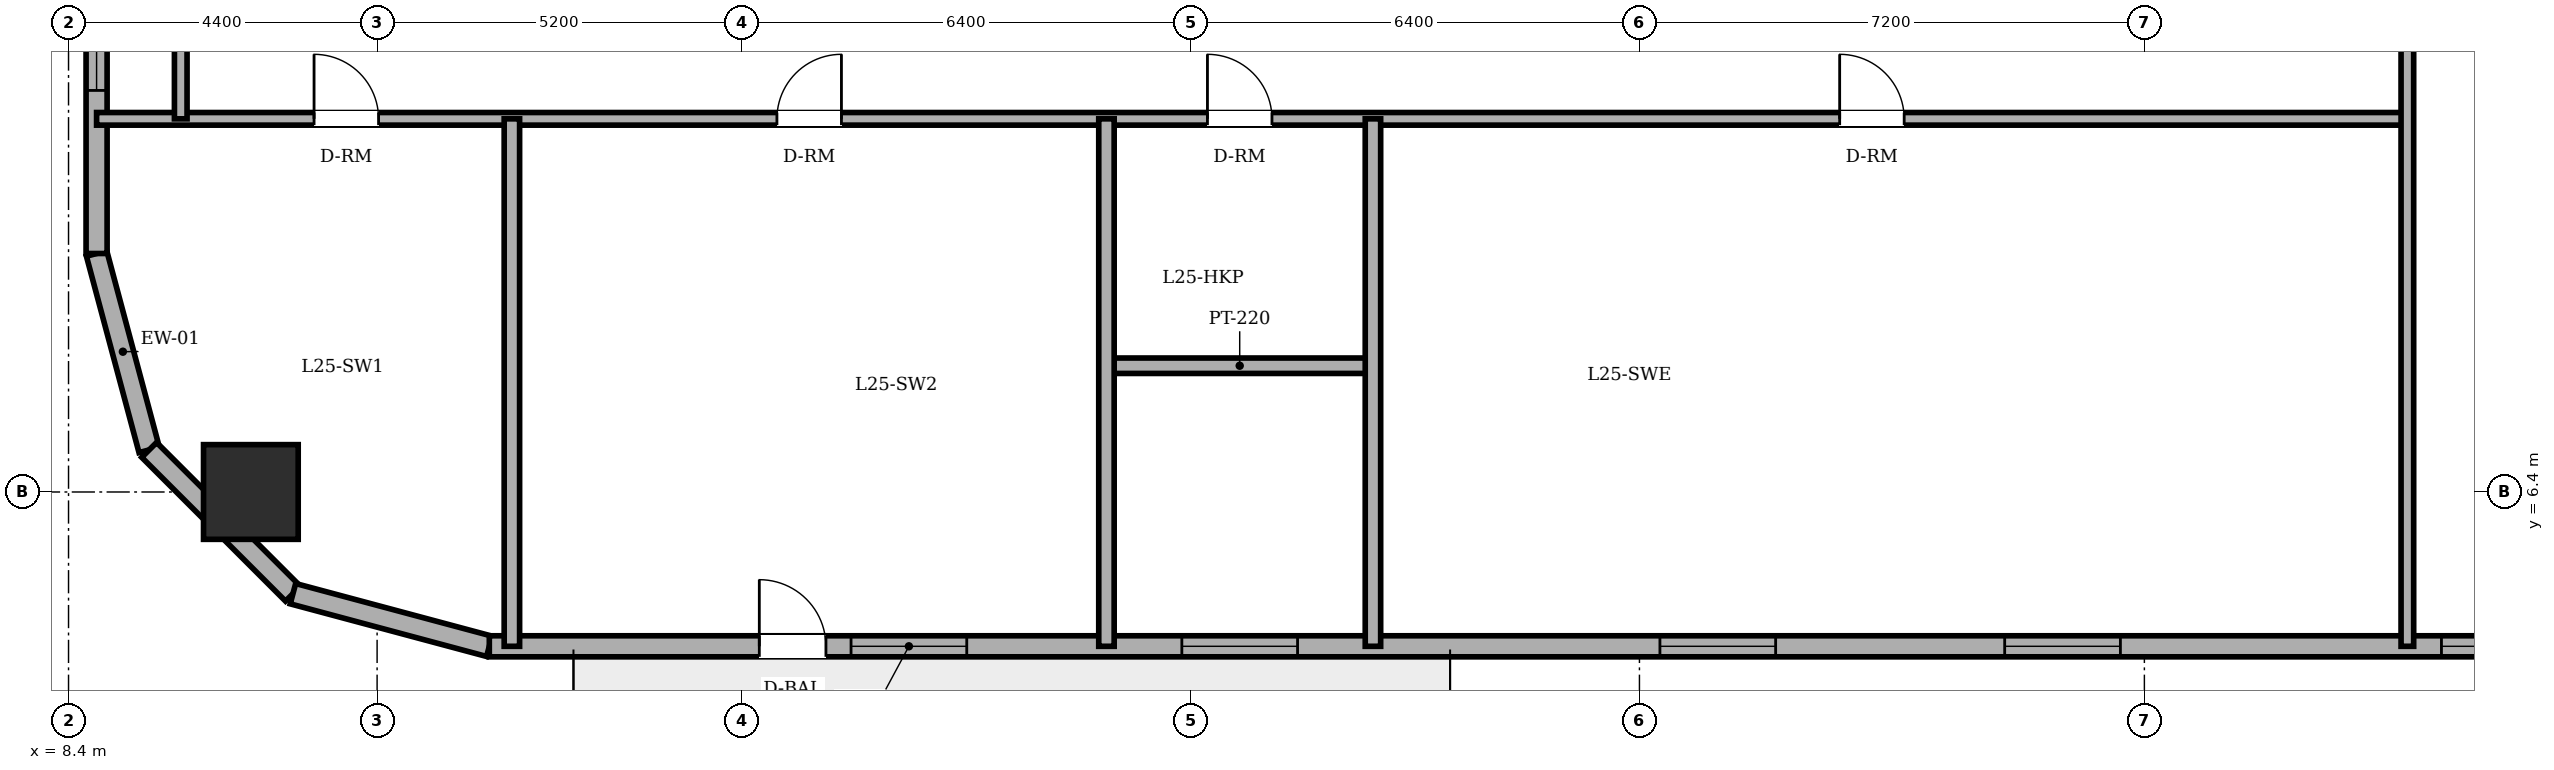
"""IFC4 building model, lengths in metres.
Left out: names, types, materials, properties, quantities, classifications, styles, units other than length and angle.
Written with IfcOpenShell. Run it as: python <this file> out.ifc"""

import sys

from ifc_helpers import new_model, si_unit, direction, frame, frame_2d, origin, origin_2d, place, context, subcontext, project, spatial, rectangle, circle, extrude, element, fill, save


model = new_model("IFC4")
c1 = context("Model", 3, precision=1e-05, world=origin(), true_north=direction((0.0, 1.0)))
c2 = subcontext(c1, "Body", "Model", "MODEL_VIEW")
j1 = project(units=[si_unit("LENGTHUNIT", "METRE"), si_unit("PLANEANGLEUNIT", "RADIAN")], contexts=[c1])
p1 = place(None, origin())
s1 = spatial("IfcSite", under=j1, at=p1, CompositionType="ELEMENT")
p2 = place(p1, origin())
s2 = spatial("IfcBuilding", under=s1, at=p2, CompositionType="ELEMENT")
p3 = place(p2, frame((0.0, 0.0, 97.1)))
s3 = spatial("IfcBuildingStorey", under=s2, at=p3, CompositionType="ELEMENT", Elevation=97.1)
p4 = place(p3, frame((11.0, 6.4, 0.0), z_axis=(0.0, 0.0, 1.0), x_axis=(1.0, 0.0, 0.0)))
e1 = element("IfcColumn", 1, at=p4, inside=s3, PredefinedType="COLUMN", context=c2, shape_type="SweptSolid", body=[
    extrude(circle(Radius=0.675, at=origin_2d()), origin(), (0.0, 0.0, 1.0), 3.6),
])
p5 = place(p3, frame((8.8, 9.8, 0.0), z_axis=(0.0, 0.0, 1.0), x_axis=(0.258731875344, -0.96594917914, 0.0)))
e2 = element("IfcWall", 2, at=p5, inside=s3, PredefinedType="SOLIDWALL", context=c2, shape_type="SweptSolid", body=[
    extrude(rectangle(XDim=2.899, YDim=0.3, at=frame_2d((1.449, 0.0))), origin(), (0.0, 0.0, 1.0), 3.4),
])
p6 = place(p3, frame((9.55, 7.0, 0.0), z_axis=(0.0, 0.0, 1.0), x_axis=(0.707106781187, -0.707106781187, 0.0)))
e3 = element("IfcWall", 3, at=p6, inside=s3, PredefinedType="SOLIDWALL", context=c2, shape_type="SweptSolid", body=[
    extrude(rectangle(XDim=2.899, YDim=0.3, at=frame_2d((1.45, 0.0))), origin(), (0.0, 0.0, 1.0), 3.4),
])
p7 = place(p3, frame((11.6, 4.95, 0.0), z_axis=(0.0, 0.0, 1.0), x_axis=(0.965943540406, -0.258752926066, 0.0)))
e4 = element("IfcWall", 4, at=p7, inside=s3, PredefinedType="SOLIDWALL", context=c2, shape_type="SweptSolid", body=[
    extrude(rectangle(XDim=2.898, YDim=0.3, at=frame_2d((1.449, 0.0))), origin(), (0.0, 0.0, 1.0), 3.4),
])
p8 = place(p3, frame((14.4, 4.2, 0.0), z_axis=(0.0, 0.0, 1.0), x_axis=(1.0, 0.0, 0.0)))
e5 = element("IfcWall", 5, at=p8, inside=s3, PredefinedType="SOLIDWALL", context=c2, shape_type="SweptSolid", body=[
    extrude(rectangle(XDim=29.933, YDim=0.3, at=frame_2d((14.967, 0.0))), origin(), (0.0, 0.0, 1.0), 3.4),
])
p9 = place(p8, frame((3.85, 0.0, 0.0)))
e6 = element("IfcOpeningElement", 6, at=p9, cuts=e5, PredefinedType="OPENING", context=c2, shape_type="SweptSolid", body=[
    extrude(rectangle(XDim=0.95, YDim=2.2, at=frame_2d((0.475, 1.1))), frame((0.0, 0.16, 0.0), z_axis=(0.0, -1.0, 0.0), x_axis=(1.0, 0.0, 0.0)), (0.0, 0.0, 1.0), 0.32),
])
p10 = place(p8, frame((5.158, 0.0, 0.85)))
e7 = element("IfcOpeningElement", 7, at=p10, cuts=e5, PredefinedType="OPENING", context=c2, shape_type="SweptSolid", body=[
    extrude(rectangle(XDim=1.65, YDim=1.55, at=frame_2d((0.825, 0.775))), frame((0.0, 0.16, 0.0), z_axis=(0.0, -1.0, 0.0), x_axis=(1.0, 0.0, 0.0)), (0.0, 0.0, 1.0), 0.32),
])
p11 = place(p8, frame((9.875, 0.0, 0.85)))
e8 = element("IfcOpeningElement", 8, at=p11, cuts=e5, PredefinedType="OPENING", context=c2, shape_type="SweptSolid", body=[
    extrude(rectangle(XDim=1.65, YDim=1.55, at=frame_2d((0.825, 0.775))), frame((0.0, 0.16, 0.0), z_axis=(0.0, -1.0, 0.0), x_axis=(1.0, 0.0, 0.0)), (0.0, 0.0, 1.0), 0.32),
])
p12 = place(p8, frame((16.692, 0.0, 0.85)))
e9 = element("IfcOpeningElement", 9, at=p12, cuts=e5, PredefinedType="OPENING", context=c2, shape_type="SweptSolid", body=[
    extrude(rectangle(XDim=1.65, YDim=1.55, at=frame_2d((0.825, 0.775))), frame((0.0, 0.16, 0.0), z_axis=(0.0, -1.0, 0.0), x_axis=(1.0, 0.0, 0.0)), (0.0, 0.0, 1.0), 0.32),
])
p13 = place(p8, frame((21.608, 0.0, 0.85)))
e10 = element("IfcOpeningElement", 10, at=p13, cuts=e5, PredefinedType="OPENING", context=c2, shape_type="SweptSolid", body=[
    extrude(rectangle(XDim=1.65, YDim=1.55, at=frame_2d((0.825, 0.775))), frame((0.0, 0.16, 0.0), z_axis=(0.0, -1.0, 0.0), x_axis=(1.0, 0.0, 0.0)), (0.0, 0.0, 1.0), 0.32),
])
p14 = place(p8, frame((27.836, 0.0, 0.85)))
e11 = element("IfcOpeningElement", 11, at=p14, cuts=e5, PredefinedType="OPENING", context=c2, shape_type="SweptSolid", body=[
    extrude(rectangle(XDim=1.05, YDim=1.55, at=frame_2d((0.525, 0.775))), frame((0.0, 0.16, 0.0), z_axis=(0.0, -1.0, 0.0), x_axis=(1.0, 0.0, 0.0)), (0.0, 0.0, 1.0), 0.32),
])
p15 = place(p3, frame((8.8, 38.2, 0.0), z_axis=(0.0, 0.0, 1.0), x_axis=(0.0, -1.0, 0.0)))
e12 = element("IfcWall", 12, at=p15, inside=s3, PredefinedType="SOLIDWALL", context=c2, shape_type="SweptSolid", body=[
    extrude(rectangle(XDim=28.4, YDim=0.3, at=frame_2d((14.2, 0.0))), origin(), (0.0, 0.0, 1.0), 3.4),
])
p16 = place(p15, frame((2.325, 0.0, 0.85)))
e13 = element("IfcOpeningElement", 13, at=p16, cuts=e12, PredefinedType="OPENING", context=c2, shape_type="SweptSolid", body=[
    extrude(rectangle(XDim=1.65, YDim=1.55, at=frame_2d((0.825, 0.775))), frame((0.0, 0.16, 0.0), z_axis=(0.0, -1.0, 0.0), x_axis=(1.0, 0.0, 0.0)), (0.0, 0.0, 1.0), 0.32),
])
p17 = place(p15, frame((7.328, 0.0, 0.85)))
e14 = element("IfcOpeningElement", 14, at=p17, cuts=e12, PredefinedType="OPENING", context=c2, shape_type="SweptSolid", body=[
    extrude(rectangle(XDim=1.65, YDim=1.55, at=frame_2d((0.825, 0.775))), frame((0.0, 0.16, 0.0), z_axis=(0.0, -1.0, 0.0), x_axis=(1.0, 0.0, 0.0)), (0.0, 0.0, 1.0), 0.32),
])
p18 = place(p15, frame((11.102, 0.0, 0.85)))
e15 = element("IfcOpeningElement", 15, at=p18, cuts=e12, PredefinedType="OPENING", context=c2, shape_type="SweptSolid", body=[
    extrude(rectangle(XDim=1.65, YDim=1.55, at=frame_2d((0.825, 0.775))), frame((0.0, 0.16, 0.0), z_axis=(0.0, -1.0, 0.0), x_axis=(1.0, 0.0, 0.0)), (0.0, 0.0, 1.0), 0.32),
])
p19 = place(p15, frame((17.648, 0.0, 0.85)))
e16 = element("IfcOpeningElement", 16, at=p19, cuts=e12, PredefinedType="OPENING", context=c2, shape_type="SweptSolid", body=[
    extrude(rectangle(XDim=1.65, YDim=1.55, at=frame_2d((0.825, 0.775))), frame((0.0, 0.16, 0.0), z_axis=(0.0, -1.0, 0.0), x_axis=(1.0, 0.0, 0.0)), (0.0, 0.0, 1.0), 0.32),
])
p20 = place(p15, frame((20.422, 0.0, 0.85)))
e17 = element("IfcOpeningElement", 17, at=p20, cuts=e12, PredefinedType="OPENING", context=c2, shape_type="SweptSolid", body=[
    extrude(rectangle(XDim=1.65, YDim=1.55, at=frame_2d((0.825, 0.775))), frame((0.0, 0.16, 0.0), z_axis=(0.0, -1.0, 0.0), x_axis=(1.0, 0.0, 0.0)), (0.0, 0.0, 1.0), 0.32),
])
p21 = place(p15, frame((24.425, 0.0, 0.85)))
e18 = element("IfcOpeningElement", 18, at=p21, cuts=e12, PredefinedType="OPENING", context=c2, shape_type="SweptSolid", body=[
    extrude(rectangle(XDim=1.65, YDim=1.55, at=frame_2d((0.825, 0.775))), frame((0.0, 0.16, 0.0), z_axis=(0.0, -1.0, 0.0), x_axis=(1.0, 0.0, 0.0)), (0.0, 0.0, 1.0), 0.32),
])
p22 = place(p3, frame((23.2, 8.2, 0.0), z_axis=(0.0, 0.0, 1.0), x_axis=(1.0, 0.0, 0.0)))
e19 = element("IfcWall", 19, at=p22, inside=s3, PredefinedType="PARTITIONING", context=c2, shape_type="SweptSolid", body=[
    extrude(rectangle(XDim=3.8, YDim=0.22, at=frame_2d((1.9, 0.0))), origin(), (0.0, 0.0, 1.0), 3.4),
])
p23 = place(p3, frame((8.8, 11.72, 0.0), z_axis=(0.0, 0.0, 1.0), x_axis=(1.0, 0.0, 0.0)))
e20 = element("IfcWall", 20, at=p23, inside=s3, PredefinedType="PARTITIONING", context=c2, shape_type="SweptSolid", body=[
    extrude(rectangle(XDim=32.95, YDim=0.18, at=frame_2d((16.475, 0.0))), origin(), (0.0, 0.0, 1.0), 3.4),
])
p24 = place(p23, frame((15.84, 0.0, 0.0)))
e21 = element("IfcOpeningElement", 21, at=p24, cuts=e20, PredefinedType="OPENING", context=c2, shape_type="SweptSolid", body=[
    extrude(rectangle(XDim=0.92, YDim=2.1, at=frame_2d((0.46, 1.05))), frame((0.0, 0.1, 0.0), z_axis=(0.0, -1.0, 0.0), x_axis=(1.0, 0.0, 0.0)), (0.0, 0.0, 1.0), 0.2),
])
p25 = place(p23, frame((3.101, 0.0, 0.0)))
e22 = element("IfcOpeningElement", 22, at=p25, cuts=e20, PredefinedType="OPENING", context=c2, shape_type="SweptSolid", body=[
    extrude(rectangle(XDim=0.92, YDim=2.1, at=frame_2d((0.46, 1.05))), frame((0.0, 0.1, 0.0), z_axis=(0.0, -1.0, 0.0), x_axis=(1.0, 0.0, 0.0)), (0.0, 0.0, 1.0), 0.2),
])
p26 = place(p23, frame((9.701, 0.0, 0.0)))
e23 = element("IfcOpeningElement", 23, at=p26, cuts=e20, PredefinedType="OPENING", context=c2, shape_type="SweptSolid", body=[
    extrude(rectangle(XDim=0.92, YDim=2.1, at=frame_2d((0.46, 1.05))), frame((0.0, 0.1, 0.0), z_axis=(0.0, -1.0, 0.0), x_axis=(1.0, 0.0, 0.0)), (0.0, 0.0, 1.0), 0.2),
])
p27 = place(p23, frame((24.855, 0.0, 0.0)))
e24 = element("IfcOpeningElement", 24, at=p27, cuts=e20, PredefinedType="OPENING", context=c2, shape_type="SweptSolid", body=[
    extrude(rectangle(XDim=0.92, YDim=2.1, at=frame_2d((0.46, 1.05))), frame((0.0, 0.1, 0.0), z_axis=(0.0, -1.0, 0.0), x_axis=(1.0, 0.0, 0.0)), (0.0, 0.0, 1.0), 0.2),
])
p28 = place(p3, frame((10.0, 11.72, 0.0), z_axis=(0.0, 0.0, 1.0), x_axis=(0.0, 1.0, 0.0)))
e25 = element("IfcWall", 25, at=p28, inside=s3, PredefinedType="PARTITIONING", context=c2, shape_type="SweptSolid", body=[
    extrude(rectangle(XDim=2.46, YDim=0.18, at=frame_2d((1.23, 0.0))), origin(), (0.0, 0.0, 1.0), 3.4),
])
for number, where, z_axis, x_axis in (
    (26, (14.722, 4.2, 0.0), (0.0, 0.0, 1.0), (0.0, 1.0, 0.0)),
    (27, (23.2, 4.2, 0.0), (0.0, 0.0, 1.0), (0.0, 1.0, 0.0)),
    (28, (27.0, 4.2, 0.0), (0.0, 0.0, 1.0), (0.0, 1.0, 0.0)),
):
    element("IfcWall", number, at=place(p3, frame(where, z_axis=z_axis, x_axis=x_axis)), inside=s3, PredefinedType="PARTITIONING", context=c2, shape_type="SweptSolid", body=[
        extrude(rectangle(XDim=7.52, YDim=0.22, at=frame_2d((3.76, 0.0))), origin(), (0.0, 0.0, 1.0), 3.4),
    ])
p29 = place(p3, frame((41.75, 4.2, 0.0), z_axis=(0.0, 0.0, 1.0), x_axis=(0.0, 1.0, 0.0)))
e29 = element("IfcWall", 29, at=p29, inside=s3, PredefinedType="PARTITIONING", context=c2, shape_type="SweptSolid", body=[
    extrude(rectangle(XDim=18.62, YDim=0.18, at=frame_2d((9.31, 0.0))), origin(), (0.0, 0.0, 1.0), 3.4),
])
p30 = place(p29, frame((12.31, 0.0, 0.0)))
e30 = element("IfcOpeningElement", 30, at=p30, cuts=e29, PredefinedType="OPENING", context=c2, shape_type="SweptSolid", body=[
    extrude(rectangle(XDim=1.0, YDim=2.15, at=frame_2d((0.5, 1.075))), frame((0.0, 0.1, 0.0), z_axis=(0.0, -1.0, 0.0), x_axis=(1.0, 0.0, 0.0)), (0.0, 0.0, 1.0), 0.2),
])
p31 = place(p9, origin())
e31 = element("IfcDoor", 31, at=p31, inside=s3, OperationType="SINGLE_SWING_LEFT", PredefinedType="DOOR", context=c2, shape_type="SweptSolid", body=[
    extrude(rectangle(XDim=0.95, YDim=2.2, at=frame_2d((0.475, 1.1))), frame((0.0, 0.025, 0.0), z_axis=(0.0, -1.0, 0.0), x_axis=(1.0, 0.0, 0.0)), (0.0, 0.0, 1.0), 0.05),
])
fill(e6, e31)
p32 = place(p10, origin())
e32 = element("IfcWindow", 32, at=p32, inside=s3, PartitioningType="DOUBLE_PANEL_VERTICAL", PredefinedType="WINDOW", context=c2, shape_type="SweptSolid", body=[
    extrude(rectangle(XDim=1.65, YDim=1.55, at=frame_2d((0.825, 0.775))), frame((0.0, 0.03, 0.0), z_axis=(0.0, -1.0, 0.0), x_axis=(1.0, 0.0, 0.0)), (0.0, 0.0, 1.0), 0.06),
])
fill(e7, e32)
p33 = place(p11, origin())
e33 = element("IfcWindow", 33, at=p33, inside=s3, PartitioningType="DOUBLE_PANEL_VERTICAL", PredefinedType="WINDOW", context=c2, shape_type="SweptSolid", body=[
    extrude(rectangle(XDim=1.65, YDim=1.55, at=frame_2d((0.825, 0.775))), frame((0.0, 0.03, 0.0), z_axis=(0.0, -1.0, 0.0), x_axis=(1.0, 0.0, 0.0)), (0.0, 0.0, 1.0), 0.06),
])
fill(e8, e33)
p34 = place(p12, origin())
e34 = element("IfcWindow", 34, at=p34, inside=s3, PartitioningType="DOUBLE_PANEL_VERTICAL", PredefinedType="WINDOW", context=c2, shape_type="SweptSolid", body=[
    extrude(rectangle(XDim=1.65, YDim=1.55, at=frame_2d((0.825, 0.775))), frame((0.0, 0.03, 0.0), z_axis=(0.0, -1.0, 0.0), x_axis=(1.0, 0.0, 0.0)), (0.0, 0.0, 1.0), 0.06),
])
fill(e9, e34)
p35 = place(p13, origin())
e35 = element("IfcWindow", 35, at=p35, inside=s3, PartitioningType="DOUBLE_PANEL_VERTICAL", PredefinedType="WINDOW", context=c2, shape_type="SweptSolid", body=[
    extrude(rectangle(XDim=1.65, YDim=1.55, at=frame_2d((0.825, 0.775))), frame((0.0, 0.03, 0.0), z_axis=(0.0, -1.0, 0.0), x_axis=(1.0, 0.0, 0.0)), (0.0, 0.0, 1.0), 0.06),
])
fill(e10, e35)
p36 = place(p21, origin())
e36 = element("IfcWindow", 36, at=p36, inside=s3, PartitioningType="DOUBLE_PANEL_VERTICAL", PredefinedType="WINDOW", context=c2, shape_type="SweptSolid", body=[
    extrude(rectangle(XDim=1.65, YDim=1.55, at=frame_2d((0.825, 0.775))), frame((0.0, 0.03, 0.0), z_axis=(0.0, -1.0, 0.0), x_axis=(1.0, 0.0, 0.0)), (0.0, 0.0, 1.0), 0.06),
])
fill(e18, e36)
p37 = place(p14, origin())
e37 = element("IfcWindow", 37, at=p37, inside=s3, PartitioningType="SINGLE_PANEL", PredefinedType="WINDOW", context=c2, shape_type="SweptSolid", body=[
    extrude(rectangle(XDim=1.05, YDim=1.55, at=frame_2d((0.525, 0.775))), frame((0.0, 0.03, 0.0), z_axis=(0.0, -1.0, 0.0), x_axis=(1.0, 0.0, 0.0)), (0.0, 0.0, 1.0), 0.06),
])
fill(e11, e37)
p38 = place(p24, origin())
e38 = element("IfcDoor", 38, at=p38, inside=s3, OperationType="SINGLE_SWING_LEFT", PredefinedType="DOOR", context=c2, shape_type="SweptSolid", body=[
    extrude(rectangle(XDim=0.92, YDim=2.1, at=frame_2d((0.46, 1.05))), frame((0.0, 0.025, 0.0), z_axis=(0.0, -1.0, 0.0), x_axis=(1.0, 0.0, 0.0)), (0.0, 0.0, 1.0), 0.05),
])
fill(e21, e38)
p39 = place(p25, origin())
e39 = element("IfcDoor", 39, at=p39, inside=s3, OperationType="SINGLE_SWING_LEFT", PredefinedType="DOOR", context=c2, shape_type="SweptSolid", body=[
    extrude(rectangle(XDim=0.92, YDim=2.1, at=frame_2d((0.46, 1.05))), frame((0.0, 0.025, 0.0), z_axis=(0.0, -1.0, 0.0), x_axis=(1.0, 0.0, 0.0)), (0.0, 0.0, 1.0), 0.05),
])
fill(e22, e39)
p40 = place(p26, origin())
e40 = element("IfcDoor", 40, at=p40, inside=s3, OperationType="SINGLE_SWING_RIGHT", PredefinedType="DOOR", context=c2, shape_type="SweptSolid", body=[
    extrude(rectangle(XDim=0.92, YDim=2.1, at=frame_2d((0.46, 1.05))), frame((0.0, 0.025, 0.0), z_axis=(0.0, -1.0, 0.0), x_axis=(1.0, 0.0, 0.0)), (0.0, 0.0, 1.0), 0.05),
])
fill(e23, e40)
p41 = place(p27, origin())
e41 = element("IfcDoor", 41, at=p41, inside=s3, OperationType="SINGLE_SWING_LEFT", PredefinedType="DOOR", context=c2, shape_type="SweptSolid", body=[
    extrude(rectangle(XDim=0.92, YDim=2.1, at=frame_2d((0.46, 1.05))), frame((0.0, 0.025, 0.0), z_axis=(0.0, -1.0, 0.0), x_axis=(1.0, 0.0, 0.0)), (0.0, 0.0, 1.0), 0.05),
])
fill(e24, e41)
save(model, sys.argv[1])
